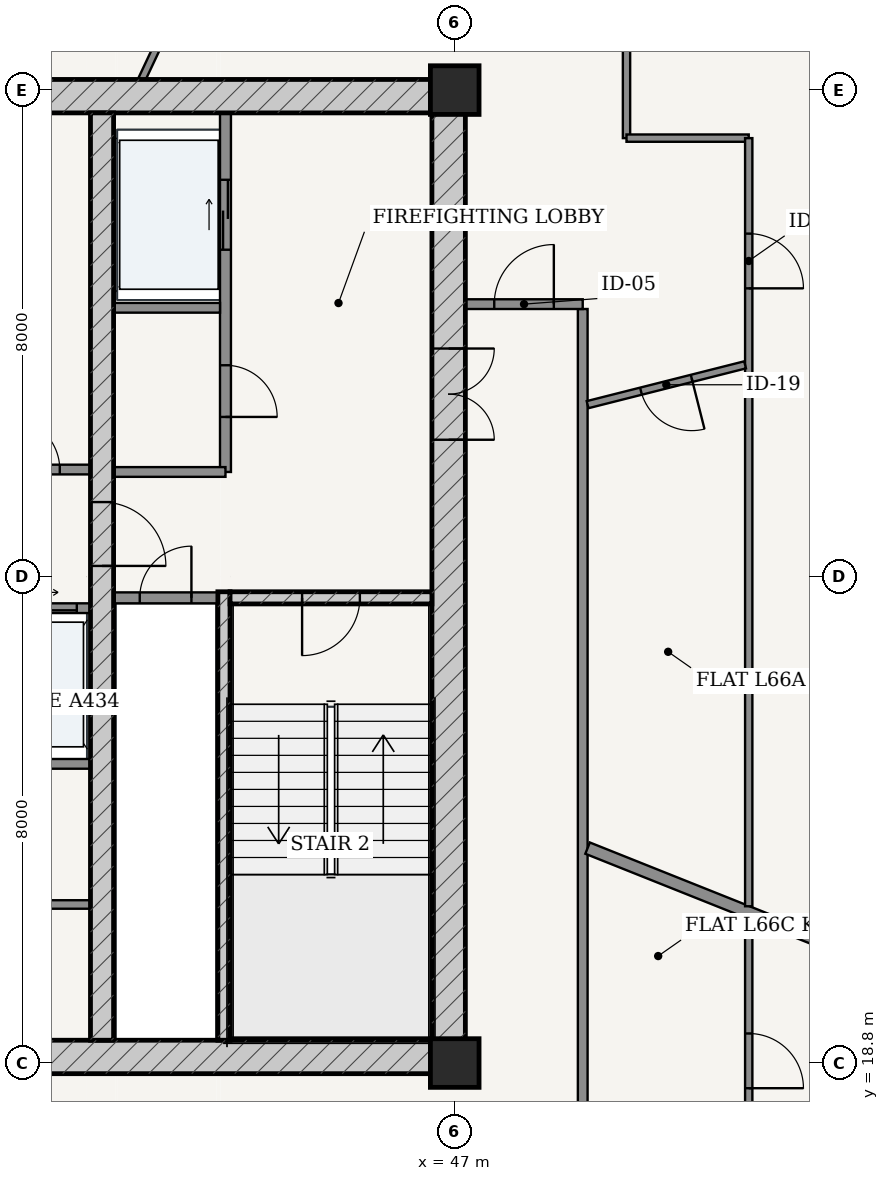
"""IFC4 building model, lengths in metres.
Left out: names, types, materials, properties, quantities, classifications, styles, units other than length and angle.
Written with IfcOpenShell. Run it as: python <this file> out.ifc"""

import sys

from ifc_helpers import new_model, si_unit, direction, frame, frame_2d, origin, origin_2d, place, context, subcontext, project, spatial, rectangle, extrude, source, transform, mapped, element, fill, save


model = new_model("IFC4")
c1 = context("Model", 3, precision=1e-05, world=origin(), true_north=direction((-0.2419218956, 0.970295726276)))
c2 = subcontext(c1, "Body", "Model", "MODEL_VIEW")
j1 = project(units=[si_unit("LENGTHUNIT", "METRE"), si_unit("PLANEANGLEUNIT", "RADIAN")], contexts=[c1])
p1 = place(None, origin())
s1 = spatial("IfcSite", under=j1, at=p1, CompositionType="ELEMENT")
p2 = place(p1, origin())
s2 = spatial("IfcBuilding", under=s1, at=p2, CompositionType="ELEMENT")
p3 = place(p2, frame((0.0, 0.0, 251.95)))
s3 = spatial("IfcBuildingStorey", under=s2, at=p3, CompositionType="ELEMENT", Elevation=251.95)
for number, where, z_axis, x_axis in (
    (1, (47.0, 18.8, 0.0), (0.0, 0.0, 1.0), (1.0, 0.0, 0.0)),
    (2, (47.0, 34.8, 0.0), (0.0, 0.0, 1.0), (1.0, 0.0, 0.0)),
):
    element("IfcColumn", number, at=place(p3, frame(where, z_axis=z_axis, x_axis=x_axis)), inside=s3, PredefinedType="COLUMN", context=c2, shape_type="SweptSolid", body=[
        extrude(rectangle(XDim=0.8, YDim=0.8, at=origin_2d()), origin(), (0.0, 0.0, 1.0), 3.75),
    ])
p4 = place(p3, frame((28.825, 18.9, 0.0), z_axis=(0.0, 0.0, 1.0), x_axis=(1.0, 0.0, 0.0)))
e3 = element("IfcWall", 3, at=p4, inside=s3, PredefinedType="SHEAR", context=c2, shape_type="SweptSolid", body=[
    extrude(rectangle(XDim=18.35, YDim=0.55, at=frame_2d((9.175, 0.0))), origin(), (0.0, 0.0, 1.0), 3.49),
])
p5 = place(p4, frame((7.41, 0.0, 0.0)))
e4 = element("IfcOpeningElement", 4, at=p5, cuts=e3, PredefinedType="OPENING", context=c2, shape_type="SweptSolid", body=[
    extrude(rectangle(XDim=0.85, YDim=2.1, at=frame_2d((0.425, 1.05))), frame((0.0, 0.285, 0.0), z_axis=(0.0, -1.0, 0.0), x_axis=(1.0, 0.0, 0.0)), (0.0, 0.0, 1.0), 0.57),
])
p6 = place(p4, frame((10.49, 0.0, 0.0)))
e5 = element("IfcOpeningElement", 5, at=p6, cuts=e3, PredefinedType="OPENING", context=c2, shape_type="SweptSolid", body=[
    extrude(rectangle(XDim=0.85, YDim=2.1, at=frame_2d((0.425, 1.05))), frame((0.0, 0.285, 0.0), z_axis=(0.0, -1.0, 0.0), x_axis=(1.0, 0.0, 0.0)), (0.0, 0.0, 1.0), 0.57),
])
p7 = place(p3, frame((28.825, 34.7, 0.0), z_axis=(0.0, 0.0, 1.0), x_axis=(1.0, 0.0, 0.0)))
e6 = element("IfcWall", 6, at=p7, inside=s3, PredefinedType="SHEAR", context=c2, shape_type="SweptSolid", body=[
    extrude(rectangle(XDim=18.35, YDim=0.55, at=frame_2d((9.175, 0.0))), origin(), (0.0, 0.0, 1.0), 3.49),
])
p8 = place(p3, frame((46.9, 19.175, 0.0), z_axis=(0.0, 0.0, 1.0), x_axis=(0.0, 1.0, 0.0)))
e7 = element("IfcWall", 7, at=p8, inside=s3, PredefinedType="SHEAR", context=c2, shape_type="SweptSolid", body=[
    extrude(rectangle(XDim=15.25, YDim=0.55, at=frame_2d((7.625, 0.0))), origin(), (0.0, 0.0, 1.0), 3.49),
])
p9 = place(p8, frame((9.875, 0.0, 0.0)))
e8 = element("IfcOpeningElement", 8, at=p9, cuts=e7, PredefinedType="OPENING", context=c2, shape_type="SweptSolid", body=[
    extrude(rectangle(XDim=1.5, YDim=2.2, at=frame_2d((0.75, 1.1))), frame((0.0, 0.285, 0.0), z_axis=(0.0, -1.0, 0.0), x_axis=(1.0, 0.0, 0.0)), (0.0, 0.0, 1.0), 0.57),
])
p10 = place(p3, frame((43.205, 19.175, 0.0), z_axis=(0.0, 0.0, 1.0), x_axis=(0.0, 1.0, 0.0)))
e9 = element("IfcWall", 9, at=p10, inside=s3, PredefinedType="SOLIDWALL", context=c2, shape_type="SweptSolid", body=[
    extrude(rectangle(XDim=7.375, YDim=0.2, at=frame_2d((3.688, 0.0))), origin(), (0.0, 0.0, 1.0), 3.49),
])
p11 = place(p3, frame((43.305, 26.45, 0.0), z_axis=(0.0, 0.0, 1.0), x_axis=(1.0, 0.0, 0.0)))
e10 = element("IfcWall", 10, at=p11, inside=s3, PredefinedType="SOLIDWALL", context=c2, shape_type="SweptSolid", body=[
    extrude(rectangle(XDim=3.32, YDim=0.2, at=frame_2d((1.66, 0.0))), origin(), (0.0, 0.0, 1.0), 3.49),
])
p12 = place(p11, frame((1.185, 0.0, 0.0)))
e11 = element("IfcOpeningElement", 11, at=p12, cuts=e10, PredefinedType="OPENING", context=c2, shape_type="SweptSolid", body=[
    extrude(rectangle(XDim=0.95, YDim=2.15, at=frame_2d((0.475, 1.075))), frame((0.0, 0.11, 0.0), z_axis=(0.0, -1.0, 0.0), x_axis=(1.0, 0.0, 0.0)), (0.0, 0.0, 1.0), 0.22),
])
p13 = place(p3, frame((41.2, 19.175, 0.0), z_axis=(0.0, 0.0, 1.0), x_axis=(0.0, 1.0, 0.0)))
e12 = element("IfcWall", 12, at=p13, inside=s3, PredefinedType="SHEAR", context=c2, shape_type="SweptSolid", body=[
    extrude(rectangle(XDim=15.25, YDim=0.38, at=frame_2d((7.625, 0.0))), origin(), (0.0, 0.0, 1.0), 3.49),
])
p14 = place(p13, frame((7.8, 0.0, 0.0)))
e13 = element("IfcOpeningElement", 13, at=p14, cuts=e12, PredefinedType="OPENING", context=c2, shape_type="SweptSolid", body=[
    extrude(rectangle(XDim=1.05, YDim=2.15, at=frame_2d((0.525, 1.075))), frame((0.0, 0.2, 0.0), z_axis=(0.0, -1.0, 0.0), x_axis=(1.0, 0.0, 0.0)), (0.0, 0.0, 1.0), 0.4),
])
p15 = place(p3, frame((41.39, 26.45, 0.0), z_axis=(0.0, 0.0, 1.0), x_axis=(1.0, 0.0, 0.0)))
e14 = element("IfcWall", 14, at=p15, inside=s3, PredefinedType="PARTITIONING", context=c2, shape_type="SweptSolid", body=[
    extrude(rectangle(XDim=1.71, YDim=0.18, at=frame_2d((0.855, 0.0))), origin(), (0.0, 0.0, 1.0), 3.49),
])
p16 = place(p15, frame((0.43, 0.0, 0.0)))
e15 = element("IfcOpeningElement", 15, at=p16, cuts=e14, PredefinedType="OPENING", context=c2, shape_type="SweptSolid", body=[
    extrude(rectangle(XDim=0.85, YDim=2.1, at=frame_2d((0.425, 1.05))), frame((0.0, 0.1, 0.0), z_axis=(0.0, -1.0, 0.0), x_axis=(1.0, 0.0, 0.0)), (0.0, 0.0, 1.0), 0.2),
])
p17 = place(p3, frame((43.23, 28.52, 0.0), z_axis=(0.0, 0.0, 1.0), x_axis=(0.0, 1.0, 0.0)))
e16 = element("IfcWall", 16, at=p17, inside=s3, PredefinedType="PARTITIONING", context=c2, shape_type="SweptSolid", body=[
    extrude(rectangle(XDim=5.905, YDim=0.18, at=frame_2d((2.953, 0.0))), origin(), (0.0, 0.0, 1.0), 3.49),
])
p18 = place(p17, frame((0.905, 0.0, 0.0)))
e17 = element("IfcOpeningElement", 17, at=p18, cuts=e16, PredefinedType="OPENING", context=c2, shape_type="SweptSolid", body=[
    extrude(rectangle(XDim=0.85, YDim=2.1, at=frame_2d((0.425, 1.05))), frame((0.0, 0.1, 0.0), z_axis=(0.0, -1.0, 0.0), x_axis=(1.0, 0.0, 0.0)), (0.0, 0.0, 1.0), 0.2),
])
p19 = place(p17, frame((3.655, 0.0, 0.0)))
e18 = element("IfcOpeningElement", 18, at=p19, cuts=e16, PredefinedType="OPENING", context=c2, shape_type="SweptSolid", body=[
    extrude(rectangle(XDim=1.15, YDim=2.2, at=frame_2d((0.575, 1.1))), frame((0.0, 0.1, 0.0), z_axis=(0.0, -1.0, 0.0), x_axis=(1.0, 0.0, 0.0)), (0.0, 0.0, 1.0), 0.2),
])
p20 = place(p3, frame((41.39, 31.22, 0.0), z_axis=(0.0, 0.0, 1.0), x_axis=(1.0, 0.0, 0.0)))
e19 = element("IfcWall", 19, at=p20, inside=s3, PredefinedType="PARTITIONING", context=c2, shape_type="SweptSolid", body=[
    extrude(rectangle(XDim=1.75, YDim=0.16, at=frame_2d((0.875, 0.0))), origin(), (0.0, 0.0, 1.0), 3.49),
])
p21 = place(p3, frame((41.39, 28.52, 0.0), z_axis=(0.0, 0.0, 1.0), x_axis=(1.0, 0.0, 0.0)))
e20 = element("IfcWall", 20, at=p21, inside=s3, PredefinedType="PARTITIONING", context=c2, shape_type="SweptSolid", body=[
    extrude(rectangle(XDim=1.84, YDim=0.16, at=frame_2d((0.92, 0.0))), origin(), (0.0, 0.0, 1.0), 3.49),
])
p22 = place(p3, frame((34.99, 28.56, 0.0), z_axis=(0.0, 0.0, 1.0), x_axis=(1.0, 0.0, 0.0)))
e21 = element("IfcWall", 21, at=p22, inside=s3, PredefinedType="PARTITIONING", context=c2, shape_type="SweptSolid", body=[
    extrude(rectangle(XDim=6.02, YDim=0.16, at=frame_2d((3.01, 0.0))), origin(), (0.0, 0.0, 1.0), 3.49),
])
p23 = place(p22, frame((0.505, 0.0, 0.0)))
e22 = element("IfcOpeningElement", 22, at=p23, cuts=e21, PredefinedType="OPENING", context=c2, shape_type="SweptSolid", body=[
    extrude(rectangle(XDim=0.85, YDim=2.1, at=frame_2d((0.425, 1.05))), frame((0.0, 0.09, 0.0), z_axis=(0.0, -1.0, 0.0), x_axis=(1.0, 0.0, 0.0)), (0.0, 0.0, 1.0), 0.18),
])
p24 = place(p22, frame((2.58, 0.0, 0.0)))
e23 = element("IfcOpeningElement", 23, at=p24, cuts=e21, PredefinedType="OPENING", context=c2, shape_type="SweptSolid", body=[
    extrude(rectangle(XDim=0.86, YDim=2.1, at=frame_2d((0.43, 1.05))), frame((0.0, 0.09, 0.0), z_axis=(0.0, -1.0, 0.0), x_axis=(1.0, 0.0, 0.0)), (0.0, 0.0, 1.0), 0.18),
])
p25 = place(p22, frame((4.665, 0.0, 0.0)))
e24 = element("IfcOpeningElement", 24, at=p25, cuts=e21, PredefinedType="OPENING", context=c2, shape_type="SweptSolid", body=[
    extrude(rectangle(XDim=0.85, YDim=2.1, at=frame_2d((0.425, 1.05))), frame((0.0, 0.09, 0.0), z_axis=(0.0, -1.0, 0.0), x_axis=(1.0, 0.0, 0.0)), (0.0, 0.0, 1.0), 0.18),
])
p26 = place(p3, frame((34.99, 26.28, 0.0), z_axis=(0.0, 0.0, 1.0), x_axis=(1.0, 0.0, 0.0)))
e25 = element("IfcWall", 25, at=p26, inside=s3, PredefinedType="PARTITIONING", context=c2, shape_type="SweptSolid", body=[
    extrude(rectangle(XDim=6.02, YDim=0.16, at=frame_2d((3.01, 0.0))), origin(), (0.0, 0.0, 1.0), 3.49),
])
p27 = place(p26, frame((1.045, 0.0, 0.0)))
e26 = element("IfcOpeningElement", 26, at=p27, cuts=e25, PredefinedType="OPENING", context=c2, shape_type="SweptSolid", body=[
    extrude(rectangle(XDim=0.85, YDim=2.1, at=frame_2d((0.425, 1.05))), frame((0.0, 0.09, 0.0), z_axis=(0.0, -1.0, 0.0), x_axis=(1.0, 0.0, 0.0)), (0.0, 0.0, 1.0), 0.18),
])
p28 = place(p26, frame((3.215, 0.0, 0.0)))
e27 = element("IfcOpeningElement", 27, at=p28, cuts=e25, PredefinedType="OPENING", context=c2, shape_type="SweptSolid", body=[
    extrude(rectangle(XDim=1.1, YDim=2.2, at=frame_2d((0.55, 1.1))), frame((0.0, 0.09, 0.0), z_axis=(0.0, -1.0, 0.0), x_axis=(1.0, 0.0, 0.0)), (0.0, 0.0, 1.0), 0.18),
])
p29 = place(p26, frame((4.695, 0.0, 0.0)))
e28 = element("IfcOpeningElement", 28, at=p29, cuts=e25, PredefinedType="OPENING", context=c2, shape_type="SweptSolid", body=[
    extrude(rectangle(XDim=1.1, YDim=2.2, at=frame_2d((0.55, 1.1))), frame((0.0, 0.09, 0.0), z_axis=(0.0, -1.0, 0.0), x_axis=(1.0, 0.0, 0.0)), (0.0, 0.0, 1.0), 0.18),
])
p30 = place(p3, frame((34.99, 23.72, 0.0), z_axis=(0.0, 0.0, 1.0), x_axis=(1.0, 0.0, 0.0)))
e29 = element("IfcWall", 29, at=p30, inside=s3, PredefinedType="PARTITIONING", context=c2, shape_type="SweptSolid", body=[
    extrude(rectangle(XDim=6.02, YDim=0.16, at=frame_2d((3.01, 0.0))), origin(), (0.0, 0.0, 1.0), 3.49),
])
p31 = place(p3, frame((38.4, 21.407, 0.0), z_axis=(0.0, 0.0, 1.0), x_axis=(1.0, 0.0, 0.0)))
e30 = element("IfcWall", 30, at=p31, inside=s3, PredefinedType="PARTITIONING", context=c2, shape_type="SweptSolid", body=[
    extrude(rectangle(XDim=2.61, YDim=0.14, at=frame_2d((1.305, 0.0))), origin(), (0.0, 0.0, 1.0), 3.49),
])
p32 = place(p31, frame((0.88, 0.0, 0.0)))
e31 = element("IfcOpeningElement", 31, at=p32, cuts=e30, PredefinedType="OPENING", context=c2, shape_type="SweptSolid", body=[
    extrude(rectangle(XDim=0.85, YDim=2.1, at=frame_2d((0.425, 1.05))), frame((0.0, 0.08, 0.0), z_axis=(0.0, -1.0, 0.0), x_axis=(1.0, 0.0, 0.0)), (0.0, 0.0, 1.0), 0.16),
])
p33 = place(p3, frame((49.105, 17.275, 0.0), z_axis=(0.0, 0.0, 1.0), x_axis=(0.0, 1.0, 0.0)))
e32 = element("IfcWall", 32, at=p33, inside=s3, PredefinedType="PARTITIONING", context=c2, shape_type="SweptSolid", body=[
    extrude(rectangle(XDim=13.925, YDim=0.16, at=frame_2d((6.962, 0.0))), origin(), (0.0, 0.0, 1.0), 3.015),
])
p34 = place(p3, frame((47.175, 31.28, 0.0), z_axis=(0.0, 0.0, 1.0), x_axis=(1.0, 0.0, 0.0)))
e33 = element("IfcWall", 33, at=p34, inside=s3, PredefinedType="PARTITIONING", context=c2, shape_type="SweptSolid", body=[
    extrude(rectangle(XDim=1.93, YDim=0.16, at=frame_2d((0.965, 0.0))), origin(), (0.0, 0.0, 1.0), 3.49),
])
p35 = place(p34, frame((0.475, 0.0, 0.0)))
e34 = element("IfcOpeningElement", 34, at=p35, cuts=e33, PredefinedType="OPENING", context=c2, shape_type="SweptSolid", body=[
    extrude(rectangle(XDim=0.98, YDim=2.2, at=frame_2d((0.49, 1.1))), frame((0.0, 0.09, 0.0), z_axis=(0.0, -1.0, 0.0), x_axis=(1.0, 0.0, 0.0)), (0.0, 0.0, 1.0), 0.18),
])
p36 = place(p3, frame((49.185, 22.334, 0.0), z_axis=(0.0, 0.0, 1.0), x_axis=(0.928710518269, -0.370805573389, 0.0)))
e35 = element("IfcWall", 35, at=p36, inside=s3, PredefinedType="PARTITIONING", context=c2, shape_type="SweptSolid", body=[
    extrude(rectangle(XDim=7.195, YDim=0.2, at=frame_2d((3.598, 0.0))), origin(), (0.0, 0.0, 1.0), 3.121),
])
p37 = place(p3, frame((49.825, 37.625, 0.0), z_axis=(0.0, 0.0, 1.0), x_axis=(0.0, -1.0, 0.0)))
e36 = element("IfcWall", 36, at=p37, inside=s3, PredefinedType="PARTITIONING", context=c2, shape_type="SweptSolid", body=[
    extrude(rectangle(XDim=3.615, YDim=0.12, at=frame_2d((1.808, 0.0))), origin(), (0.0, 0.0, 1.0), 3.015),
])
p38 = place(p3, frame((49.825, 34.01, 0.0), z_axis=(0.0, 0.0, 1.0), x_axis=(1.0, 0.0, 0.0)))
e37 = element("IfcWall", 37, at=p38, inside=s3, PredefinedType="PARTITIONING", context=c2, shape_type="SweptSolid", body=[
    extrude(rectangle(XDim=2.01, YDim=0.12, at=frame_2d((1.005, 0.0))), origin(), (0.0, 0.0, 1.0), 3.209),
])
p39 = place(p3, frame((51.835, 34.01, 0.0), z_axis=(0.0, 0.0, 1.0), x_axis=(0.0, -1.0, 0.0)))
e38 = element("IfcWall", 38, at=p39, inside=s3, PredefinedType="PARTITIONING", context=c2, shape_type="SweptSolid", body=[
    extrude(rectangle(XDim=12.632, YDim=0.12, at=frame_2d((6.316, 0.0))), origin(), (0.0, 0.0, 1.0), 3.015),
])
p40 = place(p39, frame((1.57, 0.0, 0.0)))
e39 = element("IfcOpeningElement", 39, at=p40, cuts=e38, PredefinedType="OPENING", context=c2, shape_type="SweptSolid", body=[
    extrude(rectangle(XDim=0.9, YDim=2.15, at=frame_2d((0.45, 1.075))), frame((0.0, 0.07, 0.0), z_axis=(0.0, -1.0, 0.0), x_axis=(1.0, 0.0, 0.0)), (0.0, 0.0, 1.0), 0.14),
])
p41 = place(p3, frame((49.185, 29.627, 0.0), z_axis=(0.0, 0.0, 1.0), x_axis=(0.969515658159, 0.2450293627, 0.0)))
e40 = element("IfcWall", 40, at=p41, inside=s3, PredefinedType="PARTITIONING", context=c2, shape_type="SweptSolid", body=[
    extrude(rectangle(XDim=2.671, YDim=0.12, at=frame_2d((1.336, 0.0))), origin(), (0.0, 0.0, 1.0), 3.209),
])
p42 = place(p41, frame((0.906, 0.0, 0.0)))
e41 = element("IfcOpeningElement", 41, at=p42, cuts=e40, PredefinedType="OPENING", context=c2, shape_type="SweptSolid", body=[
    extrude(rectangle(XDim=0.86, YDim=2.15, at=frame_2d((0.43, 1.075))), frame((0.0, 0.07, 0.0), z_axis=(0.0, -1.0, 0.0), x_axis=(1.0, 0.0, 0.0)), (0.0, 0.0, 1.0), 0.14),
])
p43 = place(p3, frame((41.854, 34.977, 0.0), z_axis=(0.0, 0.0, 1.0), x_axis=(0.42640827804, 0.904530806783, 0.0)))
e42 = element("IfcWall", 42, at=p43, inside=s3, PredefinedType="PARTITIONING", context=c2, shape_type="SweptSolid", body=[
    extrude(rectangle(XDim=2.866, YDim=0.12, at=frame_2d((1.433, 0.0))), origin(), (0.0, 0.0, 1.0), 3.49),
])
p44 = place(p43, frame((0.983, 0.0, 0.0)))
e43 = element("IfcOpeningElement", 43, at=p44, cuts=e42, PredefinedType="OPENING", context=c2, shape_type="SweptSolid", body=[
    extrude(rectangle(XDim=0.9, YDim=2.15, at=frame_2d((0.45, 1.075))), frame((0.0, 0.07, 0.0), z_axis=(0.0, -1.0, 0.0), x_axis=(1.0, 0.0, 0.0)), (0.0, 0.0, 1.0), 0.14),
])
p45 = place(p3, frame((51.835, 21.174, 0.0), z_axis=(0.0, 0.0, 1.0), x_axis=(0.0, -1.0, 0.0)))
e44 = element("IfcWall", 44, at=p45, inside=s3, PredefinedType="PARTITIONING", context=c2, shape_type="SweptSolid", body=[
    extrude(rectangle(XDim=6.709, YDim=0.12, at=frame_2d((3.354, 0.0))), origin(), (0.0, 0.0, 1.0), 3.015),
])
p46 = place(p45, frame((1.888, 0.0, 0.0)))
e45 = element("IfcOpeningElement", 45, at=p46, cuts=e44, PredefinedType="OPENING", context=c2, shape_type="SweptSolid", body=[
    extrude(rectangle(XDim=0.9, YDim=2.15, at=frame_2d((0.45, 1.075))), frame((0.0, 0.07, 0.0), z_axis=(0.0, -1.0, 0.0), x_axis=(1.0, 0.0, 0.0)), (0.0, 0.0, 1.0), 0.14),
])
m1 = source(origin(), c2, "Body", "SweptSolid", [
    extrude(rectangle(XDim=1.5, YDim=2.2, at=frame_2d((0.75, 1.1))), frame((0.0, 0.025, 0.0), z_axis=(0.0, -1.0, 0.0), x_axis=(1.0, 0.0, 0.0)), (0.0, 0.0, 1.0), 0.05),
])
p47 = place(p9, frame((1.5, 0.0, 0.0), z_axis=(0.0, 0.0, 1.0), x_axis=(-1.0, 0.0, 0.0)))
e46 = element("IfcDoor", 46, at=p47, inside=s3, OperationType="DOUBLE_DOOR_SINGLE_SWING", PredefinedType="DOOR", context=c2, shape_type="MappedRepresentation", body=[
    mapped(m1, transform((0.0, 0.0, 0.0), scale=1.0)),
])
fill(e8, e46)
m2 = source(origin(), c2, "Body", "SweptSolid", [
    extrude(rectangle(XDim=1.05, YDim=2.15, at=frame_2d((0.525, 1.075))), frame((0.0, 0.025, 0.0), z_axis=(0.0, -1.0, 0.0), x_axis=(1.0, 0.0, 0.0)), (0.0, 0.0, 1.0), 0.05),
])
p48 = place(p14, frame((1.05, 0.0, 0.0), z_axis=(0.0, 0.0, 1.0), x_axis=(-1.0, 0.0, 0.0)))
e47 = element("IfcDoor", 47, at=p48, inside=s3, OperationType="SINGLE_SWING_RIGHT", PredefinedType="DOOR", context=c2, shape_type="MappedRepresentation", body=[
    mapped(m2, transform((0.0, 0.0, 0.0), scale=1.0)),
])
fill(e13, e47)
m3 = source(origin(), c2, "Body", "SweptSolid", [
    extrude(rectangle(XDim=0.95, YDim=2.15, at=frame_2d((0.475, 1.075))), frame((0.0, 0.025, 0.0), z_axis=(0.0, -1.0, 0.0), x_axis=(1.0, 0.0, 0.0)), (0.0, 0.0, 1.0), 0.05),
])
p49 = place(p12, frame((0.95, 0.0, 0.0), z_axis=(0.0, 0.0, 1.0), x_axis=(-1.0, 0.0, 0.0)))
e48 = element("IfcDoor", 48, at=p49, inside=s3, OperationType="SINGLE_SWING_RIGHT", PredefinedType="DOOR", context=c2, shape_type="MappedRepresentation", body=[
    mapped(m3, transform((0.0, 0.0, 0.0), scale=1.0)),
])
fill(e11, e48)
m4 = source(origin(), c2, "Body", "SweptSolid", [
    extrude(rectangle(XDim=0.85, YDim=2.1, at=frame_2d((0.425, 1.05))), frame((0.0, 0.025, 0.0), z_axis=(0.0, -1.0, 0.0), x_axis=(1.0, 0.0, 0.0)), (0.0, 0.0, 1.0), 0.05),
])
p50 = place(p16, origin())
e49 = element("IfcDoor", 49, at=p50, inside=s3, OperationType="SINGLE_SWING_RIGHT", PredefinedType="DOOR", context=c2, shape_type="MappedRepresentation", body=[
    mapped(m4, transform((0.0, 0.0, 0.0), scale=1.0)),
])
fill(e15, e49)
p51 = place(p18, frame((0.85, 0.0, 0.0), z_axis=(0.0, 0.0, 1.0), x_axis=(-1.0, 0.0, 0.0)))
e50 = element("IfcDoor", 50, at=p51, inside=s3, OperationType="SINGLE_SWING_RIGHT", PredefinedType="DOOR", context=c2, shape_type="MappedRepresentation", body=[
    mapped(m4, transform((0.0, 0.0, 0.0), scale=1.0)),
])
fill(e17, e50)
p52 = place(p25, origin())
e51 = element("IfcDoor", 51, at=p52, inside=s3, OperationType="SINGLE_SWING_LEFT", PredefinedType="DOOR", context=c2, shape_type="MappedRepresentation", body=[
    mapped(m4, transform((0.0, 0.0, 0.0), scale=1.0)),
])
fill(e24, e51)
m5 = source(origin(), c2, "Body", "SweptSolid", [
    extrude(rectangle(XDim=1.15, YDim=2.2, at=frame_2d((0.575, 1.1))), frame((0.0, 0.025, 0.0), z_axis=(0.0, -1.0, 0.0), x_axis=(1.0, 0.0, 0.0)), (0.0, 0.0, 1.0), 0.05),
])
p53 = place(p19, origin())
e52 = element("IfcDoor", 52, at=p53, inside=s3, OperationType="DOUBLE_DOOR_SLIDING", PredefinedType="DOOR", context=c2, shape_type="MappedRepresentation", body=[
    mapped(m5, transform((0.0, 0.0, 0.0), scale=1.0)),
])
fill(e18, e52)
m6 = source(origin(), c2, "Body", "SweptSolid", [
    extrude(rectangle(XDim=1.1, YDim=2.2, at=frame_2d((0.55, 1.1))), frame((0.0, 0.025, 0.0), z_axis=(0.0, -1.0, 0.0), x_axis=(1.0, 0.0, 0.0)), (0.0, 0.0, 1.0), 0.05),
])
p54 = place(p29, origin())
e53 = element("IfcDoor", 53, at=p54, inside=s3, OperationType="DOUBLE_DOOR_SLIDING", PredefinedType="DOOR", context=c2, shape_type="MappedRepresentation", body=[
    mapped(m6, transform((0.0, 0.0, 0.0), scale=1.0)),
])
fill(e28, e53)
m7 = source(origin(), c2, "Body", "SweptSolid", [
    extrude(rectangle(XDim=0.98, YDim=2.2, at=frame_2d((0.49, 1.1))), frame((0.0, 0.025, 0.0), z_axis=(0.0, -1.0, 0.0), x_axis=(1.0, 0.0, 0.0)), (0.0, 0.0, 1.0), 0.05),
])
p55 = place(p35, origin())
e54 = element("IfcDoor", 54, at=p55, inside=s3, OperationType="SINGLE_SWING_RIGHT", PredefinedType="DOOR", context=c2, shape_type="MappedRepresentation", body=[
    mapped(m7, transform((0.0, 0.0, 0.0), scale=1.0)),
])
fill(e34, e54)
m8 = source(origin(), c2, "Body", "SweptSolid", [
    extrude(rectangle(XDim=0.86, YDim=2.15, at=frame_2d((0.43, 1.075))), frame((0.0, 0.025, 0.0), z_axis=(0.0, -1.0, 0.0), x_axis=(1.0, 0.0, 0.0)), (0.0, 0.0, 1.0), 0.05),
])
p56 = place(p42, frame((0.86, 0.0, 0.0), z_axis=(0.0, 0.0, 1.0), x_axis=(-1.0, 0.0, 0.0)))
e55 = element("IfcDoor", 55, at=p56, inside=s3, OperationType="SINGLE_SWING_LEFT", PredefinedType="DOOR", context=c2, shape_type="MappedRepresentation", body=[
    mapped(m8, transform((0.0, 0.0, 0.0), scale=1.0)),
])
fill(e41, e55)
m9 = source(origin(), c2, "Body", "SweptSolid", [
    extrude(rectangle(XDim=0.9, YDim=2.15, at=frame_2d((0.45, 1.075))), frame((0.0, 0.025, 0.0), z_axis=(0.0, -1.0, 0.0), x_axis=(1.0, 0.0, 0.0)), (0.0, 0.0, 1.0), 0.05),
])
p57 = place(p40, origin())
e56 = element("IfcDoor", 56, at=p57, inside=s3, OperationType="SINGLE_SWING_RIGHT", PredefinedType="DOOR", context=c2, shape_type="MappedRepresentation", body=[
    mapped(m9, transform((0.0, 0.0, 0.0), scale=1.0)),
])
fill(e39, e56)
p58 = place(p46, origin())
e57 = element("IfcDoor", 57, at=p58, inside=s3, OperationType="SINGLE_SWING_RIGHT", PredefinedType="DOOR", context=c2, shape_type="MappedRepresentation", body=[
    mapped(m9, transform((0.0, 0.0, 0.0), scale=1.0)),
])
fill(e45, e57)
save(model, sys.argv[1])
